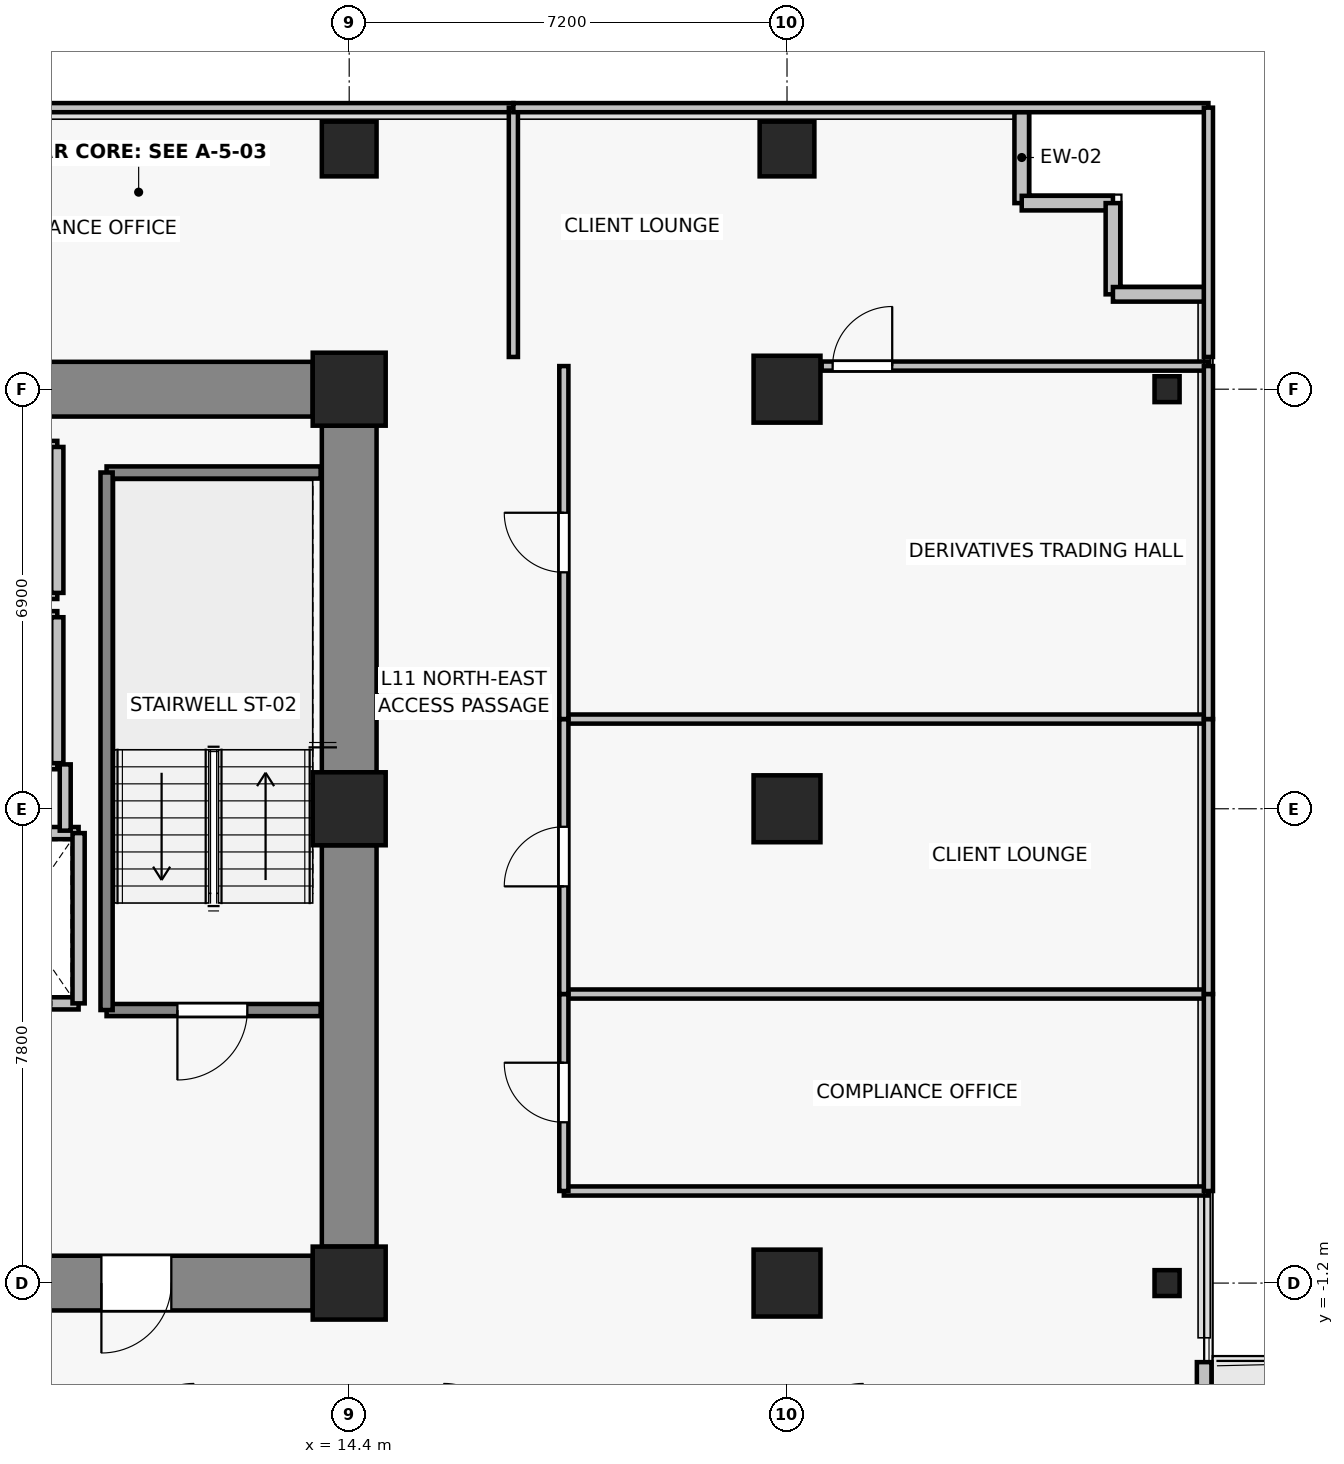
"""IFC4 building model, lengths in metres.
Left out: names, types, materials, properties, quantities, classifications, styles, units other than length and angle.
Written with IfcOpenShell. Run it as: python <this file> out.ifc"""

import sys

from ifc_helpers import new_model, si_unit, direction, frame, frame_2d, origin, origin_2d, place, context, subcontext, project, spatial, rectangle, i_section, extrude, source, transform, mapped, element, fill, save


model = new_model("IFC4")
c1 = context("Model", 3, precision=1e-05, world=origin(), true_north=direction((0.0, 1.0)))
c2 = subcontext(c1, "Body", "Model", "MODEL_VIEW")
j1 = project(units=[si_unit("LENGTHUNIT", "METRE"), si_unit("PLANEANGLEUNIT", "RADIAN")], contexts=[c1])
p1 = place(None, origin())
s1 = spatial("IfcSite", under=j1, at=p1, CompositionType="ELEMENT")
p2 = place(p1, origin())
s2 = spatial("IfcBuilding", under=s1, at=p2, CompositionType="ELEMENT")
p3 = place(p2, frame((0.0, 0.0, 43.9)))
s3 = spatial("IfcBuildingStorey", under=s2, at=p3, CompositionType="ELEMENT", Elevation=43.9)
for number, where, z_axis, x_axis in (
    (1, (14.4, -1.2, 0.0), (0.0, 0.0, 1.0), (1.0, 0.0, 0.0)),
    (2, (14.4, 6.6, 0.0), (0.0, 0.0, 1.0), (1.0, 0.0, 0.0)),
    (3, (14.4, 13.5, 0.0), (0.0, 0.0, 1.0), (1.0, 0.0, 0.0)),
):
    element("IfcColumn", number, at=place(p3, frame(where, z_axis=z_axis, x_axis=x_axis)), inside=s3, PredefinedType="COLUMN", context=c2, shape_type="SweptSolid", body=[
        extrude(rectangle(XDim=1.2, YDim=1.2, at=origin_2d()), origin(), (0.0, 0.0, 1.0), 3.3),
    ])
for number, where, z_axis, x_axis in (
    (4, (21.6, -1.2, 0.0), (0.0, 0.0, 1.0), (1.0, 0.0, 0.0)),
    (5, (21.6, 6.6, 0.0), (0.0, 0.0, 1.0), (1.0, 0.0, 0.0)),
    (6, (21.6, 13.5, 0.0), (0.0, 0.0, 1.0), (1.0, 0.0, 0.0)),
):
    element("IfcColumn", number, at=place(p3, frame(where, z_axis=z_axis, x_axis=x_axis)), inside=s3, PredefinedType="COLUMN", context=c2, shape_type="SweptSolid", body=[
        extrude(rectangle(XDim=1.1, YDim=1.1, at=origin_2d()), origin(), (0.0, 0.0, 1.0), 3.3),
    ])
for number, where, z_axis, x_axis in (
    (7, (14.4, 17.45, 0.0), (0.0, 0.0, 1.0), (1.0, 0.0, 0.0)),
    (8, (21.6, 17.45, 0.0), (0.0, 0.0, 1.0), (1.0, 0.0, 0.0)),
):
    element("IfcColumn", number, at=place(p3, frame(where, z_axis=z_axis, x_axis=x_axis)), inside=s3, PredefinedType="COLUMN", context=c2, shape_type="SweptSolid", body=[
        extrude(rectangle(XDim=0.9, YDim=0.9, at=origin_2d()), origin(), (0.0, 0.0, 1.0), 3.3),
    ])
for number, where, z_axis, x_axis in (
    (9, (27.85, -1.2, 0.0), (0.0, 0.0, 1.0), (1.0, 0.0, 0.0)),
    (10, (27.85, 13.5, 0.0), (0.0, 0.0, 1.0), (1.0, 0.0, 0.0)),
):
    element("IfcColumn", number, at=place(p3, frame(where, z_axis=z_axis, x_axis=x_axis)), inside=s3, PredefinedType="COLUMN", context=c2, shape_type="SweptSolid", body=[
        extrude(i_section(OverallWidth=0.412, OverallDepth=0.425, WebThickness=0.026, FlangeThickness=0.039, FilletRadius=0.015, at=origin_2d()), origin(), (0.0, 0.0, 1.0), 3.3),
    ])
p4 = place(p3, frame((7.8, 13.5, 0.0), z_axis=(0.0, 0.0, 1.0), x_axis=(1.0, 0.0, 0.0)))
e11 = element("IfcWall", 11, at=p4, inside=s3, PredefinedType="SHEAR", context=c2, shape_type="SweptSolid", body=[
    extrude(rectangle(XDim=6.0, YDim=0.9, at=frame_2d((3.0, 0.0))), origin(), (0.0, 0.0, 1.0), 3.075),
])
p5 = place(p3, frame((14.4, -0.6, 0.0), z_axis=(0.0, 0.0, 1.0), x_axis=(0.0, 1.0, 0.0)))
e12 = element("IfcWall", 12, at=p5, inside=s3, PredefinedType="SHEAR", context=c2, shape_type="SweptSolid", body=[
    extrude(rectangle(XDim=6.6, YDim=0.9, at=frame_2d((3.3, 0.0))), origin(), (0.0, 0.0, 1.0), 3.075),
])
p6 = place(p3, frame((14.4, 7.2, 0.0), z_axis=(0.0, 0.0, 1.0), x_axis=(0.0, 1.0, 0.0)))
e13 = element("IfcWall", 13, at=p6, inside=s3, PredefinedType="SHEAR", context=c2, shape_type="SweptSolid", body=[
    extrude(rectangle(XDim=5.7, YDim=0.9, at=frame_2d((2.85, 0.0))), origin(), (0.0, 0.0, 1.0), 3.075),
])
p7 = place(p3, frame((13.8, -1.2, 0.0), z_axis=(0.0, 0.0, 1.0), x_axis=(-1.0, 0.0, 0.0)))
e14 = element("IfcWall", 14, at=p7, inside=s3, PredefinedType="SHEAR", context=c2, shape_type="SweptSolid", body=[
    extrude(rectangle(XDim=6.0, YDim=0.9, at=frame_2d((3.0, 0.0))), origin(), (0.0, 0.0, 1.0), 3.075),
])
p8 = place(p7, frame((2.325, 0.0, 0.0)))
e15 = element("IfcOpeningElement", 15, at=p8, cuts=e14, PredefinedType="OPENING", context=c2, shape_type="SweptSolid", body=[
    extrude(rectangle(XDim=1.15, YDim=2.15, at=frame_2d((0.575, 1.075))), frame((0.0, 0.46, 0.0), z_axis=(0.0, -1.0, 0.0), x_axis=(1.0, 0.0, 0.0)), (0.0, 0.0, 1.0), 0.92),
])
p9 = place(p3, frame((28.46, -2.5, 0.0), z_axis=(0.0, 0.0, 1.0), x_axis=(0.0, -1.0, 0.0)))
e16 = element("IfcWall", 16, at=p9, inside=s3, PredefinedType="SOLIDWALL", context=c2, shape_type="SweptSolid", body=[
    extrude(rectangle(XDim=5.8, YDim=0.24, at=frame_2d((2.9, 0.0))), origin(), (0.0, 0.0, 1.0), 3.075),
])
p10 = place(p9, frame((1.566, 0.0, 0.0)))
e17 = element("IfcOpeningElement", 17, at=p10, cuts=e16, PredefinedType="OPENING", context=c2, shape_type="SweptSolid", body=[
    extrude(rectangle(XDim=1.0, YDim=2.2, at=frame_2d((0.5, 1.1))), frame((0.0, 0.13, 0.0), z_axis=(0.0, -1.0, 0.0), x_axis=(1.0, 0.0, 0.0)), (0.0, 0.0, 1.0), 0.26),
])
p11 = place(p9, frame((2.916, 0.0, 0.85)))
e18 = element("IfcOpeningElement", 18, at=p11, cuts=e16, PredefinedType="OPENING", context=c2, shape_type="SweptSolid", body=[
    extrude(rectangle(XDim=0.9, YDim=1.35, at=frame_2d((0.45, 0.675))), frame((0.0, 0.13, 0.0), z_axis=(0.0, -1.0, 0.0), x_axis=(1.0, 0.0, 0.0)), (0.0, 0.0, 1.0), 0.26),
])
for number, where, z_axis, x_axis in (
    (19, (25.46, 16.56, 0.0), (0.0, 0.0, 1.0), (0.0, 1.0, 0.0)),
    (20, (26.96, 16.56, 0.0), (0.0, 0.0, 1.0), (-1.0, 0.0, 0.0)),
    (21, (26.96, 15.06, 0.0), (0.0, 0.0, 1.0), (0.0, 1.0, 0.0)),
    (22, (28.46, 15.06, 0.0), (0.0, 0.0, 1.0), (-1.0, 0.0, 0.0)),
):
    element("IfcWall", number, at=place(p3, frame(where, z_axis=z_axis, x_axis=x_axis)), inside=s3, PredefinedType="SOLIDWALL", context=c2, shape_type="SweptSolid", body=[
        extrude(rectangle(XDim=1.5, YDim=0.24, at=frame_2d((0.75, 0.0))), origin(), (0.0, 0.0, 1.0), 3.075),
    ])
p12 = place(p3, frame((9.95, 3.4, 0.0), z_axis=(0.0, 0.0, 1.0), x_axis=(-1.0, 0.0, 0.0)))
e23 = element("IfcWall", 23, at=p12, inside=s3, PredefinedType="SOLIDWALL", context=c2, shape_type="SweptSolid", body=[
    extrude(rectangle(XDim=2.0, YDim=0.2, at=frame_2d((1.0, 0.0))), origin(), (0.0, 0.0, 1.0), 3.075),
])
p13 = place(p12, frame((0.45, 0.0, 0.0)))
e24 = element("IfcOpeningElement", 24, at=p13, cuts=e23, PredefinedType="OPENING", context=c2, shape_type="SweptSolid", body=[
    extrude(rectangle(XDim=1.1, YDim=2.2, at=frame_2d((0.55, 1.1))), frame((0.0, 0.11, 0.0), z_axis=(0.0, -1.0, 0.0), x_axis=(1.0, 0.0, 0.0)), (0.0, 0.0, 1.0), 0.22),
])
p14 = place(p3, frame((7.95, 6.2, 0.0), z_axis=(0.0, 0.0, 1.0), x_axis=(1.0, 0.0, 0.0)))
e25 = element("IfcWall", 25, at=p14, inside=s3, PredefinedType="SOLIDWALL", context=c2, shape_type="SweptSolid", body=[
    extrude(rectangle(XDim=2.0, YDim=0.2, at=frame_2d((1.0, 0.0))), origin(), (0.0, 0.0, 1.0), 3.075),
])
p15 = place(p3, frame((9.95, 6.2, 0.0), z_axis=(0.0, 0.0, 1.0), x_axis=(0.0, -1.0, 0.0)))
e26 = element("IfcWall", 26, at=p15, inside=s3, PredefinedType="SOLIDWALL", context=c2, shape_type="SweptSolid", body=[
    extrude(rectangle(XDim=2.8, YDim=0.2, at=frame_2d((1.4, 0.0))), origin(), (0.0, 0.0, 1.0), 3.075),
])
for number, where, z_axis, x_axis in (
    (27, (9.6, 7.35, 0.0), (0.0, 0.0, 1.0), (-1.0, 0.0, 0.0)),
    (28, (7.4, 9.75, 0.0), (0.0, 0.0, 1.0), (1.0, 0.0, 0.0)),
):
    element("IfcWall", number, at=place(p3, frame(where, z_axis=z_axis, x_axis=x_axis)), inside=s3, PredefinedType="SOLIDWALL", context=c2, shape_type="SweptSolid", body=[
        extrude(rectangle(XDim=2.2, YDim=0.2, at=frame_2d((1.1, 0.0))), origin(), (0.0, 0.0, 1.0), 2.465),
    ])
p16 = place(p3, frame((9.6, 9.75, 0.0), z_axis=(0.0, 0.0, 1.0), x_axis=(0.0, -1.0, 0.0)))
e29 = element("IfcWall", 29, at=p16, inside=s3, PredefinedType="SOLIDWALL", context=c2, shape_type="SweptSolid", body=[
    extrude(rectangle(XDim=2.4, YDim=0.2, at=frame_2d((1.2, 0.0))), origin(), (0.0, 0.0, 1.0), 3.075),
])
for number, where, z_axis, x_axis in (
    (30, (9.6, 10.15, 0.0), (0.0, 0.0, 1.0), (-1.0, 0.0, 0.0)),
    (31, (7.4, 12.55, 0.0), (0.0, 0.0, 1.0), (1.0, 0.0, 0.0)),
):
    element("IfcWall", number, at=place(p3, frame(where, z_axis=z_axis, x_axis=x_axis)), inside=s3, PredefinedType="SOLIDWALL", context=c2, shape_type="SweptSolid", body=[
        extrude(rectangle(XDim=2.2, YDim=0.2, at=frame_2d((1.1, 0.0))), origin(), (0.0, 0.0, 1.0), 2.465),
    ])
p17 = place(p3, frame((9.6, 12.55, 0.0), z_axis=(0.0, 0.0, 1.0), x_axis=(0.0, -1.0, 0.0)))
e32 = element("IfcWall", 32, at=p17, inside=s3, PredefinedType="SOLIDWALL", context=c2, shape_type="SweptSolid", body=[
    extrude(rectangle(XDim=2.4, YDim=0.2, at=frame_2d((1.2, 0.0))), origin(), (0.0, 0.0, 1.0), 3.075),
])
p18 = place(p3, frame((13.93, 3.29, 0.0), z_axis=(0.0, 0.0, 1.0), x_axis=(-1.0, 0.0, 0.0)))
e33 = element("IfcWall", 33, at=p18, inside=s3, PredefinedType="SOLIDWALL", context=c2, shape_type="SweptSolid", body=[
    extrude(rectangle(XDim=3.52, YDim=0.2, at=frame_2d((1.76, 0.0))), origin(), (0.0, 0.0, 1.0), 3.075),
])
p19 = place(p18, frame((1.205, 0.0, 0.0)))
e34 = element("IfcOpeningElement", 34, at=p19, cuts=e33, PredefinedType="OPENING", context=c2, shape_type="SweptSolid", body=[
    extrude(rectangle(XDim=1.15, YDim=2.15, at=frame_2d((0.575, 1.075))), frame((0.0, 0.11, 0.0), z_axis=(0.0, -1.0, 0.0), x_axis=(1.0, 0.0, 0.0)), (0.0, 0.0, 1.0), 0.22),
])
p20 = place(p3, frame((10.41, 12.13, 0.0), z_axis=(0.0, 0.0, 1.0), x_axis=(1.0, 0.0, 0.0)))
e35 = element("IfcWall", 35, at=p20, inside=s3, PredefinedType="SOLIDWALL", context=c2, shape_type="SweptSolid", body=[
    extrude(rectangle(XDim=3.52, YDim=0.2, at=frame_2d((1.76, 0.0))), origin(), (0.0, 0.0, 1.0), 3.075),
])
p21 = place(p3, frame((10.41, 3.29, 0.0), z_axis=(0.0, 0.0, 1.0), x_axis=(0.0, 1.0, 0.0)))
e36 = element("IfcWall", 36, at=p21, inside=s3, PredefinedType="SOLIDWALL", context=c2, shape_type="SweptSolid", body=[
    extrude(rectangle(XDim=8.84, YDim=0.2, at=frame_2d((4.42, 0.0))), origin(), (0.0, 0.0, 1.0), 3.075),
])
p22 = place(p3, frame((9.73, 7.33, 0.0), z_axis=(0.0, 0.0, 1.0), x_axis=(0.0, -1.0, 0.0)))
e37 = element("IfcWall", 37, at=p22, inside=s3, PredefinedType="PARTITIONING", context=c2, shape_type="SweptSolid", body=[
    extrude(rectangle(XDim=1.09, YDim=0.18, at=frame_2d((0.545, 0.0))), origin(), (0.0, 0.0, 1.0), 3.075),
])
for number, where, z_axis, x_axis in (
    (38, (28.53, 0.314, 0.0), (0.0, 0.0, 1.0), (-1.0, 0.0, 0.0)),
    (39, (17.93, 3.553, 0.0), (0.0, 0.0, 1.0), (1.0, 0.0, 0.0)),
):
    element("IfcWall", number, at=place(p3, frame(where, z_axis=z_axis, x_axis=x_axis)), inside=s3, PredefinedType="PARTITIONING", context=c2, shape_type="SweptSolid", body=[
        extrude(rectangle(XDim=10.6, YDim=0.15, at=frame_2d((5.3, 0.0))), origin(), (0.0, 0.0, 1.0), 2.465),
    ])
p23 = place(p3, frame((17.93, 0.314, 0.0), z_axis=(0.0, 0.0, 1.0), x_axis=(0.0, 1.0, 0.0)))
e40 = element("IfcWall", 40, at=p23, inside=s3, PredefinedType="PARTITIONING", context=c2, shape_type="SweptSolid", body=[
    extrude(rectangle(XDim=3.239, YDim=0.15, at=frame_2d((1.62, 0.0))), origin(), (0.0, 0.0, 1.0), 3.075),
])
p24 = place(p23, frame((1.13, 0.0, 0.0)))
e41 = element("IfcOpeningElement", 41, at=p24, cuts=e40, PredefinedType="OPENING", context=c2, shape_type="SweptSolid", body=[
    extrude(rectangle(XDim=0.98, YDim=2.15, at=frame_2d((0.49, 1.075))), frame((0.0, 0.085, 0.0), z_axis=(0.0, -1.0, 0.0), x_axis=(1.0, 0.0, 0.0)), (0.0, 0.0, 1.0), 0.17),
])
p25 = place(p3, frame((28.53, 3.553, 0.0), z_axis=(0.0, 0.0, 1.0), x_axis=(0.0, -1.0, 0.0)))
e42 = element("IfcWall", 42, at=p25, inside=s3, PredefinedType="PARTITIONING", context=c2, shape_type="SweptSolid", body=[
    extrude(rectangle(XDim=3.239, YDim=0.15, at=frame_2d((1.62, 0.0))), origin(), (0.0, 0.0, 1.0), 3.075),
])
p26 = place(p3, frame((17.93, 8.075, 0.0), z_axis=(0.0, 0.0, 1.0), x_axis=(1.0, 0.0, 0.0)))
e43 = element("IfcWall", 43, at=p26, inside=s3, PredefinedType="PARTITIONING", context=c2, shape_type="SweptSolid", body=[
    extrude(rectangle(XDim=10.6, YDim=0.15, at=frame_2d((5.3, 0.0))), origin(), (0.0, 0.0, 1.0), 2.465),
])
p27 = place(p3, frame((17.93, 3.553, 0.0), z_axis=(0.0, 0.0, 1.0), x_axis=(0.0, 1.0, 0.0)))
e44 = element("IfcWall", 44, at=p27, inside=s3, PredefinedType="PARTITIONING", context=c2, shape_type="SweptSolid", body=[
    extrude(rectangle(XDim=4.522, YDim=0.15, at=frame_2d((2.261, 0.0))), origin(), (0.0, 0.0, 1.0), 2.465),
])
p28 = place(p27, frame((1.771, 0.0, 0.0)))
e45 = element("IfcOpeningElement", 45, at=p28, cuts=e44, PredefinedType="OPENING", context=c2, shape_type="SweptSolid", body=[
    extrude(rectangle(XDim=0.98, YDim=2.15, at=frame_2d((0.49, 1.075))), frame((0.0, 0.085, 0.0), z_axis=(0.0, -1.0, 0.0), x_axis=(1.0, 0.0, 0.0)), (0.0, 0.0, 1.0), 0.17),
])
p29 = place(p3, frame((28.53, 8.075, 0.0), z_axis=(0.0, 0.0, 1.0), x_axis=(0.0, -1.0, 0.0)))
e46 = element("IfcWall", 46, at=p29, inside=s3, PredefinedType="PARTITIONING", context=c2, shape_type="SweptSolid", body=[
    extrude(rectangle(XDim=4.522, YDim=0.15, at=frame_2d((2.261, 0.0))), origin(), (0.0, 0.0, 1.0), 3.075),
])
p30 = place(p3, frame((22.17, 13.88, 0.0), z_axis=(0.0, 0.0, 1.0), x_axis=(1.0, 0.0, 0.0)))
e47 = element("IfcWall", 47, at=p30, inside=s3, PredefinedType="PARTITIONING", context=c2, shape_type="SweptSolid", body=[
    extrude(rectangle(XDim=6.36, YDim=0.15, at=frame_2d((3.18, 0.0))), origin(), (0.0, 0.0, 1.0), 3.075),
])
p31 = place(p30, frame((0.18, 0.0, 0.0)))
e48 = element("IfcOpeningElement", 48, at=p31, cuts=e47, PredefinedType="OPENING", context=c2, shape_type="SweptSolid", body=[
    extrude(rectangle(XDim=0.98, YDim=2.15, at=frame_2d((0.49, 1.075))), frame((0.0, 0.085, 0.0), z_axis=(0.0, -1.0, 0.0), x_axis=(1.0, 0.0, 0.0)), (0.0, 0.0, 1.0), 0.17),
])
p32 = place(p3, frame((17.93, 8.075, 0.0), z_axis=(0.0, 0.0, 1.0), x_axis=(0.0, 1.0, 0.0)))
e49 = element("IfcWall", 49, at=p32, inside=s3, PredefinedType="PARTITIONING", context=c2, shape_type="SweptSolid", body=[
    extrude(rectangle(XDim=5.805, YDim=0.15, at=frame_2d((2.902, 0.0))), origin(), (0.0, 0.0, 1.0), 2.465),
])
p33 = place(p32, frame((2.413, 0.0, 0.0)))
e50 = element("IfcOpeningElement", 50, at=p33, cuts=e49, PredefinedType="OPENING", context=c2, shape_type="SweptSolid", body=[
    extrude(rectangle(XDim=0.98, YDim=2.15, at=frame_2d((0.49, 1.075))), frame((0.0, 0.085, 0.0), z_axis=(0.0, -1.0, 0.0), x_axis=(1.0, 0.0, 0.0)), (0.0, 0.0, 1.0), 0.17),
])
p34 = place(p3, frame((28.53, 13.88, 0.0), z_axis=(0.0, 0.0, 1.0), x_axis=(0.0, -1.0, 0.0)))
e51 = element("IfcWall", 51, at=p34, inside=s3, PredefinedType="PARTITIONING", context=c2, shape_type="SweptSolid", body=[
    extrude(rectangle(XDim=5.805, YDim=0.15, at=frame_2d((2.902, 0.0))), origin(), (0.0, 0.0, 1.0), 3.075),
])
p35 = place(p3, frame((-32.53, 18.13, 0.0), z_axis=(0.0, 0.0, 1.0), x_axis=(1.0, 0.0, 0.0)))
e52 = element("IfcWall", 52, at=p35, inside=s3, PredefinedType="PARTITIONING", context=c2, shape_type="SweptSolid", body=[
    extrude(rectangle(XDim=49.63, YDim=0.15, at=frame_2d((24.815, 0.0))), origin(), (0.0, 0.0, 1.0), 3.075),
])
p36 = place(p3, frame((17.1, 18.13, 0.0), z_axis=(0.0, 0.0, 1.0), x_axis=(0.0, -1.0, 0.0)))
e53 = element("IfcWall", 53, at=p36, inside=s3, PredefinedType="PARTITIONING", context=c2, shape_type="SweptSolid", body=[
    extrude(rectangle(XDim=4.1, YDim=0.15, at=frame_2d((2.05, 0.0))), origin(), (0.0, 0.0, 1.0), 2.465),
])
p37 = place(p3, frame((17.1, 18.13, 0.0), z_axis=(0.0, 0.0, 1.0), x_axis=(1.0, 0.0, 0.0)))
e54 = element("IfcWall", 54, at=p37, inside=s3, PredefinedType="PARTITIONING", context=c2, shape_type="SweptSolid", body=[
    extrude(rectangle(XDim=11.43, YDim=0.15, at=frame_2d((5.715, 0.0))), origin(), (0.0, 0.0, 1.0), 3.075),
])
p38 = place(p3, frame((28.53, 18.13, 0.0), z_axis=(0.0, 0.0, 1.0), x_axis=(0.0, -1.0, 0.0)))
e55 = element("IfcWall", 55, at=p38, inside=s3, PredefinedType="PARTITIONING", context=c2, shape_type="SweptSolid", body=[
    extrude(rectangle(XDim=4.1, YDim=0.15, at=frame_2d((2.05, 0.0))), origin(), (0.0, 0.0, 1.0), 3.075),
])
m1 = source(origin(), c2, "Body", "SweptSolid", [
    extrude(rectangle(XDim=1.15, YDim=2.15, at=frame_2d((0.575, 1.075))), frame((0.0, 0.025, 0.0), z_axis=(0.0, -1.0, 0.0), x_axis=(1.0, 0.0, 0.0)), (0.0, 0.0, 1.0), 0.05),
])
p39 = place(p19, origin())
e56 = element("IfcDoor", 56, at=p39, inside=s3, OperationType="SINGLE_SWING_RIGHT", PredefinedType="DOOR", context=c2, shape_type="MappedRepresentation", body=[
    mapped(m1, transform((0.0, 0.0, 0.0), x_axis=(1.0, 0.0, 0.0), y_axis=(0.0, 1.0, 0.0), z_axis=(0.0, 0.0, 1.0), scale=1.0)),
])
fill(e34, e56)
p40 = place(p8, origin())
e57 = element("IfcDoor", 57, at=p40, inside=s3, OperationType="SINGLE_SWING_RIGHT", PredefinedType="DOOR", context=c2, shape_type="MappedRepresentation", body=[
    mapped(m1, transform((0.0, 0.0, 0.0), x_axis=(1.0, 0.0, 0.0), y_axis=(0.0, 1.0, 0.0), z_axis=(0.0, 0.0, 1.0), scale=1.0)),
])
fill(e15, e57)
m2 = source(origin(), c2, "Body", "SweptSolid", [
    extrude(rectangle(XDim=0.98, YDim=2.15, at=frame_2d((0.49, 1.075))), frame((0.0, 0.025, 0.0), z_axis=(0.0, -1.0, 0.0), x_axis=(1.0, 0.0, 0.0)), (0.0, 0.0, 1.0), 0.05),
])
p41 = place(p24, origin())
e58 = element("IfcDoor", 58, at=p41, inside=s3, OperationType="SINGLE_SWING_RIGHT", PredefinedType="DOOR", context=c2, shape_type="MappedRepresentation", body=[
    mapped(m2, transform((0.0, 0.0, 0.0), x_axis=(1.0, 0.0, 0.0), y_axis=(0.0, 1.0, 0.0), z_axis=(0.0, 0.0, 1.0), scale=1.0)),
])
fill(e41, e58)
p42 = place(p28, origin())
e59 = element("IfcDoor", 59, at=p42, inside=s3, OperationType="SINGLE_SWING_LEFT", PredefinedType="DOOR", context=c2, shape_type="MappedRepresentation", body=[
    mapped(m2, transform((0.0, 0.0, 0.0), x_axis=(1.0, 0.0, 0.0), y_axis=(0.0, 1.0, 0.0), z_axis=(0.0, 0.0, 1.0), scale=1.0)),
])
fill(e45, e59)
p43 = place(p33, origin())
e60 = element("IfcDoor", 60, at=p43, inside=s3, OperationType="SINGLE_SWING_RIGHT", PredefinedType="DOOR", context=c2, shape_type="MappedRepresentation", body=[
    mapped(m2, transform((0.0, 0.0, 0.0), x_axis=(1.0, 0.0, 0.0), y_axis=(0.0, 1.0, 0.0), z_axis=(0.0, 0.0, 1.0), scale=1.0)),
])
fill(e50, e60)
p44 = place(p31, origin())
e61 = element("IfcDoor", 61, at=p44, inside=s3, OperationType="SINGLE_SWING_RIGHT", PredefinedType="DOOR", context=c2, shape_type="MappedRepresentation", body=[
    mapped(m2, transform((0.0, 0.0, 0.0), x_axis=(1.0, 0.0, 0.0), y_axis=(0.0, 1.0, 0.0), z_axis=(0.0, 0.0, 1.0), scale=1.0)),
])
fill(e48, e61)
save(model, sys.argv[1])
